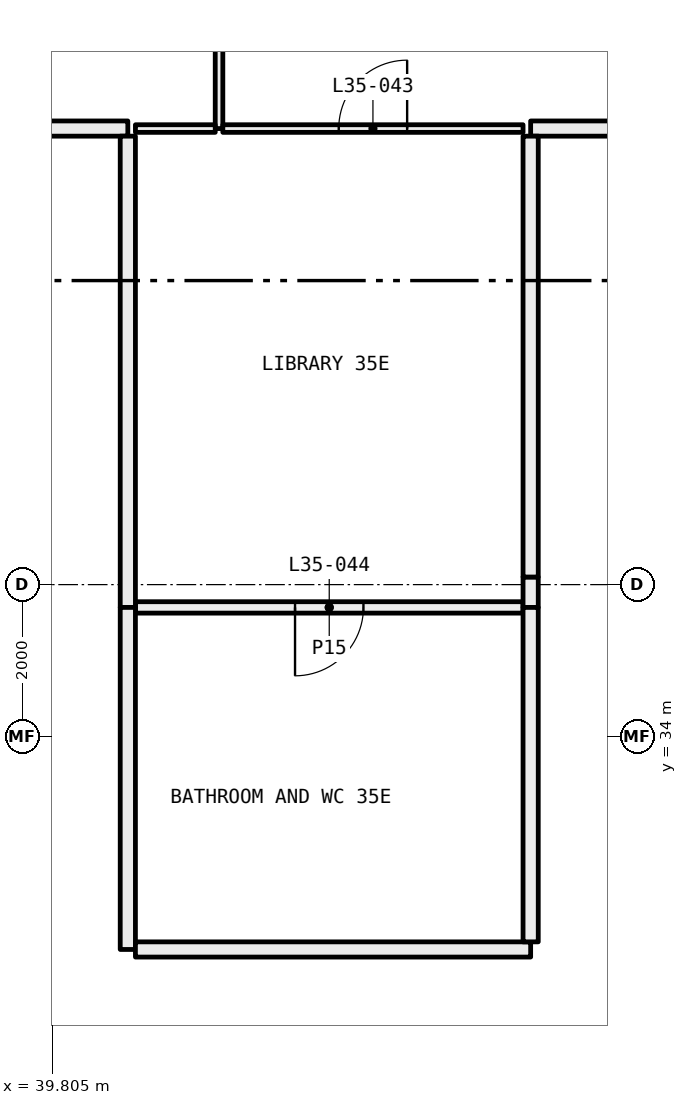
"""IFC4 building model, lengths in metres.
Left out: names, types, materials, properties, quantities, classifications, styles, units other than length and angle.
Written with IfcOpenShell. Run it as: python <this file> out.ifc"""

import sys

from ifc_helpers import new_model, si_unit, direction, frame, frame_2d, origin, place, context, subcontext, project, spatial, rectangle, extrude, element, fill, save


model = new_model("IFC4")
c1 = context("Model", 3, precision=1e-05, world=origin(), true_north=direction((0.0, 1.0)))
c2 = subcontext(c1, "Body", "Model", "MODEL_VIEW")
j1 = project(units=[si_unit("LENGTHUNIT", "METRE"), si_unit("PLANEANGLEUNIT", "RADIAN")], contexts=[c1])
p1 = place(None, origin())
s1 = spatial("IfcSite", under=j1, at=p1, CompositionType="ELEMENT")
p2 = place(p1, origin())
s2 = spatial("IfcBuilding", under=s1, at=p2, CompositionType="ELEMENT")
p3 = place(p2, frame((0.0, 0.0, 134.55)))
s3 = spatial("IfcBuildingStorey", under=s2, at=p3, CompositionType="ELEMENT", Elevation=134.55)
p4 = place(p3, frame((42.0, 42.0, 0.0), z_axis=(0.0, 0.0, 1.0), x_axis=(0.0, 1.0, 0.0)))
e1 = element("IfcWall", 1, at=p4, inside=s3, PredefinedType="PARTITIONING", context=c2, shape_type="SweptSolid", body=[
    extrude(rectangle(XDim=5.28, YDim=0.1, at=frame_2d((2.64, 0.0))), origin(), (0.0, 0.0, 1.0), 3.05),
])
p5 = place(p4, frame((2.19, 0.0, 0.0)))
e2 = element("IfcOpeningElement", 2, at=p5, cuts=e1, PredefinedType="OPENING", context=c2, shape_type="SweptSolid", body=[
    extrude(rectangle(XDim=0.9, YDim=2.1, at=frame_2d((0.45, 1.05))), frame((0.0, 0.06, 0.0), z_axis=(0.0, -1.0, 0.0), x_axis=(1.0, 0.0, 0.0)), (0.0, 0.0, 1.0), 0.12),
])
p6 = place(p3, frame((40.9, 42.0, 0.0), z_axis=(0.0, 0.0, 1.0), x_axis=(1.0, 0.0, 0.0)))
e3 = element("IfcWall", 3, at=p6, inside=s3, PredefinedType="PARTITIONING", context=c2, shape_type="SweptSolid", body=[
    extrude(rectangle(XDim=1.05, YDim=0.1, at=frame_2d((0.525, 0.0))), origin(), (0.0, 0.0, 1.0), 3.05),
])
p7 = place(p3, frame((38.5, 42.0, 0.0), z_axis=(0.0, 0.0, 1.0), x_axis=(1.0, 0.0, 0.0)))
e4 = element("IfcWall", 4, at=p7, inside=s3, PredefinedType="PARTITIONING", context=c2, shape_type="SweptSolid", body=[
    extrude(rectangle(XDim=2.3, YDim=0.2, at=frame_2d((1.15, 0.0))), origin(), (0.0, 0.0, 1.0), 3.05),
])
p8 = place(p3, frame((42.05, 42.0, 0.0), z_axis=(0.0, 0.0, 1.0), x_axis=(1.0, 0.0, 0.0)))
e5 = element("IfcWall", 5, at=p8, inside=s3, PredefinedType="PARTITIONING", context=c2, shape_type="SweptSolid", body=[
    extrude(rectangle(XDim=3.95, YDim=0.1, at=frame_2d((1.975, 0.0))), origin(), (0.0, 0.0, 1.0), 3.05),
])
p9 = place(p8, frame((1.525, 0.0, 0.0)))
e6 = element("IfcOpeningElement", 6, at=p9, cuts=e5, PredefinedType="OPENING", context=c2, shape_type="SweptSolid", body=[
    extrude(rectangle(XDim=0.9, YDim=2.1, at=frame_2d((0.45, 1.05))), frame((0.0, 0.06, 0.0), z_axis=(0.0, -1.0, 0.0), x_axis=(1.0, 0.0, 0.0)), (0.0, 0.0, 1.0), 0.12),
])
p10 = place(p3, frame((46.1, 42.0, 0.0), z_axis=(0.0, 0.0, 1.0), x_axis=(1.0, 0.0, 0.0)))
e7 = element("IfcWall", 7, at=p10, inside=s3, PredefinedType="PARTITIONING", context=c2, shape_type="SweptSolid", body=[
    extrude(rectangle(XDim=1.9, YDim=0.2, at=frame_2d((0.95, 0.0))), origin(), (0.0, 0.0, 1.0), 3.05),
])
p11 = place(p3, frame((40.9, 35.7, 0.0), z_axis=(0.0, 0.0, 1.0), x_axis=(1.0, 0.0, 0.0)))
e8 = element("IfcWall", 8, at=p11, inside=s3, PredefinedType="PARTITIONING", context=c2, shape_type="SweptSolid", body=[
    extrude(rectangle(XDim=5.1, YDim=0.15, at=frame_2d((2.55, 0.0))), origin(), (0.0, 0.0, 1.0), 3.05),
])
p12 = place(p11, frame((2.1, 0.0, 0.0)))
e9 = element("IfcOpeningElement", 9, at=p12, cuts=e8, PredefinedType="OPENING", context=c2, shape_type="SweptSolid", body=[
    extrude(rectangle(XDim=0.9, YDim=2.1, at=frame_2d((0.45, 1.05))), frame((0.0, 0.085, 0.0), z_axis=(0.0, -1.0, 0.0), x_axis=(1.0, 0.0, 0.0)), (0.0, 0.0, 1.0), 0.17),
])
p13 = place(p3, frame((40.8, 41.9, 0.0), z_axis=(0.0, 0.0, 1.0), x_axis=(0.0, -1.0, 0.0)))
e10 = element("IfcWall", 10, at=p13, inside=s3, PredefinedType="PARTITIONING", context=c2, shape_type="SweptSolid", body=[
    extrude(rectangle(XDim=6.2, YDim=0.2, at=frame_2d((3.1, 0.0))), origin(), (0.0, 0.0, 1.0), 2.45),
])
p14 = place(p3, frame((46.1, 35.7, 0.0), z_axis=(0.0, 0.0, 1.0), x_axis=(0.0, 1.0, 0.0)))
e11 = element("IfcWall", 11, at=p14, inside=s3, PredefinedType="PARTITIONING", context=c2, shape_type="SweptSolid", body=[
    extrude(rectangle(XDim=0.4, YDim=0.2, at=frame_2d((0.2, 0.0))), origin(), (0.0, 0.0, 1.0), 2.45),
])
p15 = place(p3, frame((46.1, 36.1, 0.0), z_axis=(0.0, 0.0, 1.0), x_axis=(0.0, 1.0, 0.0)))
e12 = element("IfcWall", 12, at=p15, inside=s3, PredefinedType="PARTITIONING", context=c2, shape_type="SweptSolid", body=[
    extrude(rectangle(XDim=5.8, YDim=0.2, at=frame_2d((2.9, 0.0))), origin(), (0.0, 0.0, 1.0), 3.05),
])
p16 = place(p3, frame((40.8, 35.7, 0.0), z_axis=(0.0, 0.0, 1.0), x_axis=(0.0, -1.0, 0.0)))
e13 = element("IfcWall", 13, at=p16, inside=s3, PredefinedType="PARTITIONING", context=c2, shape_type="SweptSolid", body=[
    extrude(rectangle(XDim=4.5, YDim=0.2, at=frame_2d((2.25, 0.0))), origin(), (0.0, 0.0, 1.0), 3.05),
])
p17 = place(p3, frame((40.9, 31.2, 0.0), z_axis=(0.0, 0.0, 1.0), x_axis=(1.0, 0.0, 0.0)))
e14 = element("IfcWall", 14, at=p17, inside=s3, PredefinedType="PARTITIONING", context=c2, shape_type="SweptSolid", body=[
    extrude(rectangle(XDim=5.2, YDim=0.2, at=frame_2d((2.6, 0.0))), origin(), (0.0, 0.0, 1.0), 3.05),
])
p18 = place(p3, frame((46.1, 31.3, 0.0), z_axis=(0.0, 0.0, 1.0), x_axis=(0.0, 1.0, 0.0)))
e15 = element("IfcWall", 15, at=p18, inside=s3, PredefinedType="PARTITIONING", context=c2, shape_type="SweptSolid", body=[
    extrude(rectangle(XDim=4.4, YDim=0.2, at=frame_2d((2.2, 0.0))), origin(), (0.0, 0.0, 1.0), 3.05),
])
p19 = place(p9, origin())
e16 = element("IfcDoor", 16, at=p19, inside=s3, OperationType="SINGLE_SWING_LEFT", PredefinedType="DOOR", context=c2, shape_type="SweptSolid", body=[
    extrude(rectangle(XDim=0.9, YDim=2.1, at=frame_2d((0.45, 1.05))), frame((0.0, 0.025, 0.0), z_axis=(0.0, -1.0, 0.0), x_axis=(1.0, 0.0, 0.0)), (0.0, 0.0, 1.0), 0.05),
])
fill(e6, e16)
p20 = place(p12, frame((0.9, 0.0, 0.0), x_axis=(-1.0, 0.0, 0.0)))
e17 = element("IfcDoor", 17, at=p20, inside=s3, OperationType="SINGLE_SWING_LEFT", PredefinedType="DOOR", context=c2, shape_type="SweptSolid", body=[
    extrude(rectangle(XDim=0.9, YDim=2.1, at=frame_2d((0.45, 1.05))), frame((0.0, 0.025, 0.0), z_axis=(0.0, -1.0, 0.0), x_axis=(1.0, 0.0, 0.0)), (0.0, 0.0, 1.0), 0.05),
])
fill(e9, e17)
save(model, sys.argv[1])
